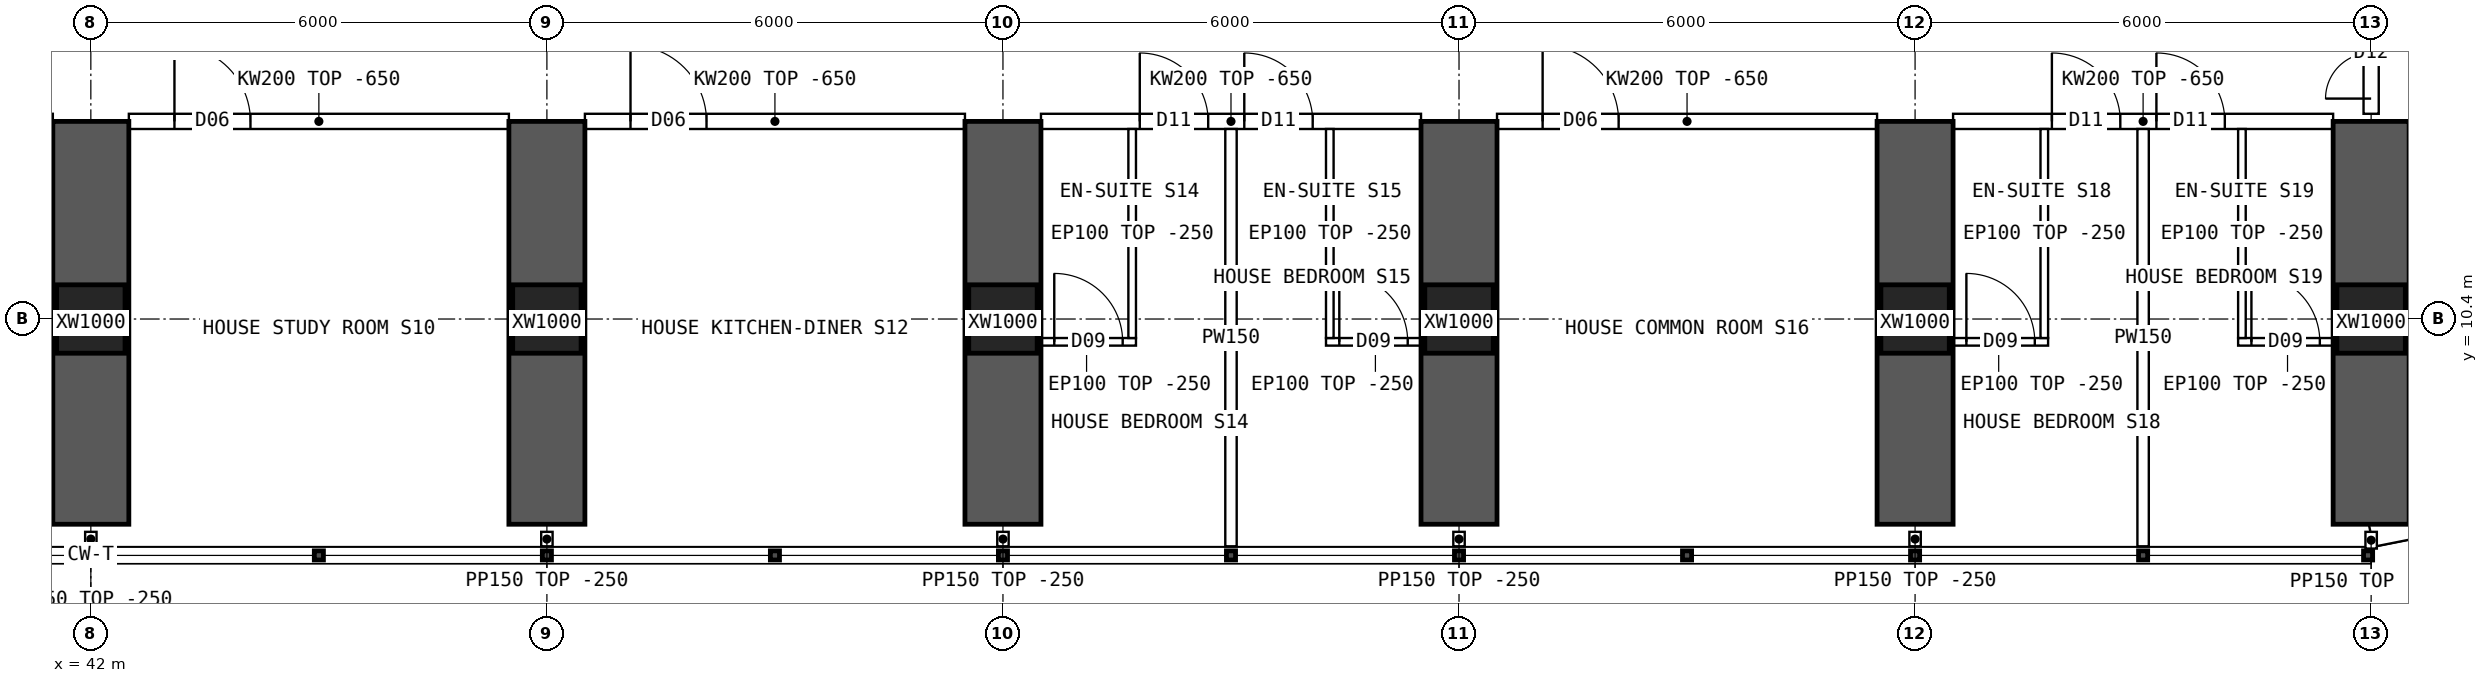
"""IFC4 building model, lengths in metres.
Left out: names, types, materials, properties, quantities, classifications, styles, units other than length and angle.
Written with IfcOpenShell. Run it as: python <this file> out.ifc"""

import sys

from ifc_helpers import new_model, si_unit, direction, frame, frame_2d, origin, origin_2d, place, context, subcontext, project, spatial, polyline, rectangle, hollow_rectangle, outline, extrude, element, fill, save


model = new_model("IFC4")
c1 = context("Model", 3, precision=1e-05, world=origin(), true_north=direction((0.0, 1.0)))
c2 = subcontext(c1, "Body", "Model", "MODEL_VIEW")
j1 = project(units=[si_unit("LENGTHUNIT", "METRE"), si_unit("PLANEANGLEUNIT", "RADIAN")], contexts=[c1])
p1 = place(None, origin())
s1 = spatial("IfcSite", under=j1, at=p1, CompositionType="ELEMENT")
p2 = place(p1, origin())
s2 = spatial("IfcBuilding", under=s1, at=p2, CompositionType="ELEMENT")
p3 = place(p2, frame((0.0, 0.0, 42.7)))
s3 = spatial("IfcBuildingStorey", under=s2, at=p3, CompositionType="ELEMENT", Elevation=42.7)
for number, where, z_axis, x_axis in (
    (1, (42.0, 10.4, 0.0), (0.0, 0.0, 1.0), (1.0, 0.0, 0.0)),
    (2, (48.0, 10.4, 0.0), (0.0, 0.0, 1.0), (1.0, 0.0, 0.0)),
    (3, (54.0, 10.4, 0.0), (0.0, 0.0, 1.0), (1.0, 0.0, 0.0)),
    (4, (60.0, 10.4, 0.0), (0.0, 0.0, 1.0), (1.0, 0.0, 0.0)),
    (5, (66.0, 10.4, 0.0), (0.0, 0.0, 1.0), (1.0, 0.0, 0.0)),
    (6, (72.0, 10.4, 0.0), (0.0, 0.0, 1.0), (1.0, 0.0, 0.0)),
):
    element("IfcColumn", number, at=place(p3, frame(where, z_axis=z_axis, x_axis=x_axis)), inside=s3, PredefinedType="COLUMN", context=c2, shape_type="SweptSolid", body=[
        extrude(hollow_rectangle(XDim=0.9, YDim=0.9, WallThickness=0.09, at=origin_2d()), origin(), (0.0, 0.0, 1.0), 3.75),
    ])
for number, where, z_axis, x_axis in (
    (7, (42.0, 7.7, 0.0), (0.0, 0.0, 1.0), (0.0, 1.0, 0.0)),
    (8, (48.0, 7.7, 0.0), (0.0, 0.0, 1.0), (0.0, 1.0, 0.0)),
    (9, (54.0, 7.7, 0.0), (0.0, 0.0, 1.0), (0.0, 1.0, 0.0)),
    (10, (60.0, 7.7, 0.0), (0.0, 0.0, 1.0), (0.0, 1.0, 0.0)),
    (11, (66.0, 7.7, 0.0), (0.0, 0.0, 1.0), (0.0, 1.0, 0.0)),
    (12, (72.0, 7.7, 0.0), (0.0, 0.0, 1.0), (0.0, 1.0, 0.0)),
):
    element("IfcWall", number, at=place(p3, frame(where, z_axis=z_axis, x_axis=x_axis)), inside=s3, PredefinedType="SHEAR", context=c2, shape_type="SweptSolid", body=[
        extrude(rectangle(XDim=5.3, YDim=1.0, at=frame_2d((2.65, 0.0))), origin(), (0.0, 0.0, 1.0), 3.75),
    ])
p4 = place(p3, frame((72.0, 7.55, 0.0), z_axis=(0.0, 0.0, 1.0), x_axis=(0.980787251524, 0.195080412259, 0.0)))
e13 = element("IfcWall", 13, at=p4, inside=s3, PredefinedType="SOLIDWALL", context=c2, shape_type="SweptSolid", body=[
    extrude(outline(polyline([(-0.03, -0.15), (3.249, -0.15), (3.189, 0.15), (0.03, 0.15), (-0.03, -0.15)])), origin(), (0.0, 0.0, 1.0), 3.5),
])
p5 = place(p4, frame((0.909, 0.0, 0.9)))
e14 = element("IfcOpeningElement", 14, at=p5, cuts=e13, PredefinedType="OPENING", context=c2, shape_type="SweptSolid", body=[
    extrude(rectangle(XDim=1.4, YDim=1.8, at=frame_2d((0.7, 0.9))), frame((0.0, 0.16, 0.0), z_axis=(0.0, -1.0, 0.0), x_axis=(1.0, 0.0, 0.0)), (0.0, 0.0, 1.0), 0.32),
])
p6 = place(p3, frame((42.5, 13.0, 0.0), z_axis=(0.0, 0.0, 1.0), x_axis=(1.0, 0.0, 0.0)))
e15 = element("IfcWall", 15, at=p6, inside=s3, PredefinedType="SOLIDWALL", context=c2, shape_type="SweptSolid", body=[
    extrude(outline(polyline([(0.0, 0.0), (5.0, 0.0), (5.0, 3.1), (0.0, 3.1), (0.0, 0.0)])), frame((0.0, 0.1, 0.0), z_axis=(0.0, -1.0, 0.0), x_axis=(1.0, 0.0, 0.0)), (0.0, 0.0, 1.0), 0.2),
])
p7 = place(p6, frame((0.6, 0.0, 0.0)))
e16 = element("IfcOpeningElement", 16, at=p7, cuts=e15, PredefinedType="OPENING", context=c2, shape_type="SweptSolid", body=[
    extrude(rectangle(XDim=1.0, YDim=2.1, at=frame_2d((0.5, 1.05))), frame((0.0, 0.11, 0.0), z_axis=(0.0, -1.0, 0.0), x_axis=(1.0, 0.0, 0.0)), (0.0, 0.0, 1.0), 0.22),
])
p8 = place(p3, frame((48.5, 13.0, 0.0), z_axis=(0.0, 0.0, 1.0), x_axis=(1.0, 0.0, 0.0)))
e17 = element("IfcWall", 17, at=p8, inside=s3, PredefinedType="SOLIDWALL", context=c2, shape_type="SweptSolid", body=[
    extrude(outline(polyline([(0.0, 0.0), (5.0, 0.0), (5.0, 3.1), (0.0, 3.1), (0.0, 0.0)])), frame((0.0, 0.1, 0.0), z_axis=(0.0, -1.0, 0.0), x_axis=(1.0, 0.0, 0.0)), (0.0, 0.0, 1.0), 0.2),
])
p9 = place(p8, frame((0.6, 0.0, 0.0)))
e18 = element("IfcOpeningElement", 18, at=p9, cuts=e17, PredefinedType="OPENING", context=c2, shape_type="SweptSolid", body=[
    extrude(rectangle(XDim=1.0, YDim=2.1, at=frame_2d((0.5, 1.05))), frame((0.0, 0.11, 0.0), z_axis=(0.0, -1.0, 0.0), x_axis=(1.0, 0.0, 0.0)), (0.0, 0.0, 1.0), 0.22),
])
p10 = place(p3, frame((54.5, 13.0, 0.0), z_axis=(0.0, 0.0, 1.0), x_axis=(1.0, 0.0, 0.0)))
e19 = element("IfcWall", 19, at=p10, inside=s3, PredefinedType="SOLIDWALL", context=c2, shape_type="SweptSolid", body=[
    extrude(outline(polyline([(0.0, 0.0), (5.0, 0.0), (5.0, 3.1), (0.0, 3.1), (0.0, 0.0)])), frame((0.0, 0.1, 0.0), z_axis=(0.0, -1.0, 0.0), x_axis=(1.0, 0.0, 0.0)), (0.0, 0.0, 1.0), 0.2),
])
p11 = place(p10, frame((1.3, 0.0, 0.0)))
e20 = element("IfcOpeningElement", 20, at=p11, cuts=e19, PredefinedType="OPENING", context=c2, shape_type="SweptSolid", body=[
    extrude(rectangle(XDim=0.9, YDim=2.1, at=frame_2d((0.45, 1.05))), frame((0.0, 0.11, 0.0), z_axis=(0.0, -1.0, 0.0), x_axis=(1.0, 0.0, 0.0)), (0.0, 0.0, 1.0), 0.22),
])
p12 = place(p10, frame((2.675, 0.0, 0.0)))
e21 = element("IfcOpeningElement", 21, at=p12, cuts=e19, PredefinedType="OPENING", context=c2, shape_type="SweptSolid", body=[
    extrude(rectangle(XDim=0.9, YDim=2.1, at=frame_2d((0.45, 1.05))), frame((0.0, 0.11, 0.0), z_axis=(0.0, -1.0, 0.0), x_axis=(1.0, 0.0, 0.0)), (0.0, 0.0, 1.0), 0.22),
])
p13 = place(p3, frame((60.5, 13.0, 0.0), z_axis=(0.0, 0.0, 1.0), x_axis=(1.0, 0.0, 0.0)))
e22 = element("IfcWall", 22, at=p13, inside=s3, PredefinedType="SOLIDWALL", context=c2, shape_type="SweptSolid", body=[
    extrude(outline(polyline([(0.0, 0.0), (5.0, 0.0), (5.0, 3.1), (0.0, 3.1), (0.0, 0.0)])), frame((0.0, 0.1, 0.0), z_axis=(0.0, -1.0, 0.0), x_axis=(1.0, 0.0, 0.0)), (0.0, 0.0, 1.0), 0.2),
])
p14 = place(p13, frame((0.6, 0.0, 0.0)))
e23 = element("IfcOpeningElement", 23, at=p14, cuts=e22, PredefinedType="OPENING", context=c2, shape_type="SweptSolid", body=[
    extrude(rectangle(XDim=1.0, YDim=2.1, at=frame_2d((0.5, 1.05))), frame((0.0, 0.11, 0.0), z_axis=(0.0, -1.0, 0.0), x_axis=(1.0, 0.0, 0.0)), (0.0, 0.0, 1.0), 0.22),
])
p15 = place(p3, frame((66.5, 13.0, 0.0), z_axis=(0.0, 0.0, 1.0), x_axis=(1.0, 0.0, 0.0)))
e24 = element("IfcWall", 24, at=p15, inside=s3, PredefinedType="SOLIDWALL", context=c2, shape_type="SweptSolid", body=[
    extrude(outline(polyline([(0.0, 0.0), (5.0, 0.0), (5.0, 3.1), (0.0, 3.1), (0.0, 0.0)])), frame((0.0, 0.1, 0.0), z_axis=(0.0, -1.0, 0.0), x_axis=(1.0, 0.0, 0.0)), (0.0, 0.0, 1.0), 0.2),
])
p16 = place(p15, frame((1.3, 0.0, 0.0)))
e25 = element("IfcOpeningElement", 25, at=p16, cuts=e24, PredefinedType="OPENING", context=c2, shape_type="SweptSolid", body=[
    extrude(rectangle(XDim=0.9, YDim=2.1, at=frame_2d((0.45, 1.05))), frame((0.0, 0.11, 0.0), z_axis=(0.0, -1.0, 0.0), x_axis=(1.0, 0.0, 0.0)), (0.0, 0.0, 1.0), 0.22),
])
p17 = place(p15, frame((2.675, 0.0, 0.0)))
e26 = element("IfcOpeningElement", 26, at=p17, cuts=e24, PredefinedType="OPENING", context=c2, shape_type="SweptSolid", body=[
    extrude(rectangle(XDim=0.9, YDim=2.1, at=frame_2d((0.45, 1.05))), frame((0.0, 0.11, 0.0), z_axis=(0.0, -1.0, 0.0), x_axis=(1.0, 0.0, 0.0)), (0.0, 0.0, 1.0), 0.22),
])
p18 = place(p3, frame((38.85, 10.3, 0.0), z_axis=(0.0, 0.0, 1.0), x_axis=(1.0, 0.0, 0.0)))
e27 = element("IfcWall", 27, at=p18, inside=s3, PredefinedType="PARTITIONING", context=c2, shape_type="SweptSolid", body=[
    extrude(outline(polyline([(0.0, 0.0), (2.7, 0.0), (2.7, 3.1), (0.0, 3.1), (0.0, 0.0)])), frame((0.0, 0.05, 0.0), z_axis=(0.0, -1.0, 0.0), x_axis=(1.0, 0.0, 0.0)), (0.0, 0.0, 1.0), 0.1),
])
p19 = place(p3, frame((57.0, 7.41, 0.0), z_axis=(0.0, 0.0, 1.0), x_axis=(0.0, 1.0, 0.0)))
e28 = element("IfcWall", 28, at=p19, inside=s3, PredefinedType="PARTITIONING", context=c2, shape_type="SweptSolid", body=[
    extrude(outline(polyline([(0.0, 0.0), (5.49, 0.0), (5.49, 3.1), (5.442, 3.1), (5.44, 3.5), (3.192, 3.5), (3.19, 3.1), (2.792, 3.1), (2.79, 3.5), (0.0, 3.5), (0.0, 0.0)])), frame((0.0, 0.075, 0.0), z_axis=(0.0, -1.0, 0.0), x_axis=(1.0, 0.0, 0.0)), (0.0, 0.0, 1.0), 0.15),
])
p20 = place(p3, frame((55.75, 10.1, 0.0), z_axis=(0.0, 0.0, 1.0), x_axis=(-1.0, 0.0, 0.0)))
e29 = element("IfcWall", 29, at=p20, inside=s3, PredefinedType="PARTITIONING", context=c2, shape_type="SweptSolid", body=[
    extrude(rectangle(XDim=1.3, YDim=0.1, at=frame_2d((0.65, 0.0))), origin(), (0.0, 0.0, 1.0), 3.5),
])
p21 = place(p20, frame((0.175, 0.0, 0.0)))
e30 = element("IfcOpeningElement", 30, at=p21, cuts=e29, PredefinedType="OPENING", context=c2, shape_type="SweptSolid", body=[
    extrude(rectangle(XDim=0.9, YDim=2.1, at=frame_2d((0.45, 1.05))), frame((0.0, 0.06, 0.0), z_axis=(0.0, -1.0, 0.0), x_axis=(1.0, 0.0, 0.0)), (0.0, 0.0, 1.0), 0.12),
])
p22 = place(p3, frame((55.7, 10.15, 0.0), z_axis=(0.0, 0.0, 1.0), x_axis=(0.0, 1.0, 0.0)))
e31 = element("IfcWall", 31, at=p22, inside=s3, PredefinedType="PARTITIONING", context=c2, shape_type="SweptSolid", body=[
    extrude(outline(polyline([(0.0, 0.0), (2.75, 0.0), (2.75, 3.1), (2.702, 3.1), (2.7, 3.5), (0.452, 3.5), (0.45, 3.1), (0.052, 3.1), (0.05, 3.5), (0.0, 3.5), (0.0, 0.0)])), frame((0.0, 0.05, 0.0), z_axis=(0.0, -1.0, 0.0), x_axis=(1.0, 0.0, 0.0)), (0.0, 0.0, 1.0), 0.1),
])
p23 = place(p3, frame((59.55, 10.1, 0.0), z_axis=(0.0, 0.0, 1.0), x_axis=(-1.0, 0.0, 0.0)))
e32 = element("IfcWall", 32, at=p23, inside=s3, PredefinedType="PARTITIONING", context=c2, shape_type="SweptSolid", body=[
    extrude(rectangle(XDim=1.3, YDim=0.1, at=frame_2d((0.65, 0.0))), origin(), (0.0, 0.0, 1.0), 3.5),
])
p24 = place(p23, frame((0.225, 0.0, 0.0)))
e33 = element("IfcOpeningElement", 33, at=p24, cuts=e32, PredefinedType="OPENING", context=c2, shape_type="SweptSolid", body=[
    extrude(rectangle(XDim=0.9, YDim=2.1, at=frame_2d((0.45, 1.05))), frame((0.0, 0.06, 0.0), z_axis=(0.0, -1.0, 0.0), x_axis=(1.0, 0.0, 0.0)), (0.0, 0.0, 1.0), 0.12),
])
p25 = place(p3, frame((58.3, 10.15, 0.0), z_axis=(0.0, 0.0, 1.0), x_axis=(0.0, 1.0, 0.0)))
e34 = element("IfcWall", 34, at=p25, inside=s3, PredefinedType="PARTITIONING", context=c2, shape_type="SweptSolid", body=[
    extrude(outline(polyline([(0.0, 0.0), (2.75, 0.0), (2.75, 3.1), (2.702, 3.1), (2.7, 3.5), (0.452, 3.5), (0.45, 3.1), (0.052, 3.1), (0.05, 3.5), (0.0, 3.5), (0.0, 0.0)])), frame((0.0, 0.05, 0.0), z_axis=(0.0, -1.0, 0.0), x_axis=(1.0, 0.0, 0.0)), (0.0, 0.0, 1.0), 0.1),
])
p26 = place(p3, frame((69.0, 7.41, 0.0), z_axis=(0.0, 0.0, 1.0), x_axis=(0.0, 1.0, 0.0)))
e35 = element("IfcWall", 35, at=p26, inside=s3, PredefinedType="PARTITIONING", context=c2, shape_type="SweptSolid", body=[
    extrude(outline(polyline([(0.0, 0.0), (5.49, 0.0), (5.49, 3.1), (5.442, 3.1), (5.44, 3.5), (3.192, 3.5), (3.19, 3.1), (2.792, 3.1), (2.79, 3.5), (0.0, 3.5), (0.0, 0.0)])), frame((0.0, 0.075, 0.0), z_axis=(0.0, -1.0, 0.0), x_axis=(1.0, 0.0, 0.0)), (0.0, 0.0, 1.0), 0.15),
])
p27 = place(p3, frame((67.75, 10.1, 0.0), z_axis=(0.0, 0.0, 1.0), x_axis=(-1.0, 0.0, 0.0)))
e36 = element("IfcWall", 36, at=p27, inside=s3, PredefinedType="PARTITIONING", context=c2, shape_type="SweptSolid", body=[
    extrude(rectangle(XDim=1.3, YDim=0.1, at=frame_2d((0.65, 0.0))), origin(), (0.0, 0.0, 1.0), 3.5),
])
p28 = place(p27, frame((0.175, 0.0, 0.0)))
e37 = element("IfcOpeningElement", 37, at=p28, cuts=e36, PredefinedType="OPENING", context=c2, shape_type="SweptSolid", body=[
    extrude(rectangle(XDim=0.9, YDim=2.1, at=frame_2d((0.45, 1.05))), frame((0.0, 0.06, 0.0), z_axis=(0.0, -1.0, 0.0), x_axis=(1.0, 0.0, 0.0)), (0.0, 0.0, 1.0), 0.12),
])
p29 = place(p3, frame((67.7, 10.15, 0.0), z_axis=(0.0, 0.0, 1.0), x_axis=(0.0, 1.0, 0.0)))
e38 = element("IfcWall", 38, at=p29, inside=s3, PredefinedType="PARTITIONING", context=c2, shape_type="SweptSolid", body=[
    extrude(outline(polyline([(0.0, 0.0), (2.75, 0.0), (2.75, 3.1), (2.702, 3.1), (2.7, 3.5), (0.452, 3.5), (0.45, 3.1), (0.052, 3.1), (0.05, 3.5), (0.0, 3.5), (0.0, 0.0)])), frame((0.0, 0.05, 0.0), z_axis=(0.0, -1.0, 0.0), x_axis=(1.0, 0.0, 0.0)), (0.0, 0.0, 1.0), 0.1),
])
p30 = place(p3, frame((71.55, 10.1, 0.0), z_axis=(0.0, 0.0, 1.0), x_axis=(-1.0, 0.0, 0.0)))
e39 = element("IfcWall", 39, at=p30, inside=s3, PredefinedType="PARTITIONING", context=c2, shape_type="SweptSolid", body=[
    extrude(rectangle(XDim=1.3, YDim=0.1, at=frame_2d((0.65, 0.0))), origin(), (0.0, 0.0, 1.0), 3.5),
])
p31 = place(p30, frame((0.225, 0.0, 0.0)))
e40 = element("IfcOpeningElement", 40, at=p31, cuts=e39, PredefinedType="OPENING", context=c2, shape_type="SweptSolid", body=[
    extrude(rectangle(XDim=0.9, YDim=2.1, at=frame_2d((0.45, 1.05))), frame((0.0, 0.06, 0.0), z_axis=(0.0, -1.0, 0.0), x_axis=(1.0, 0.0, 0.0)), (0.0, 0.0, 1.0), 0.12),
])
p32 = place(p3, frame((70.3, 10.15, 0.0), z_axis=(0.0, 0.0, 1.0), x_axis=(0.0, 1.0, 0.0)))
e41 = element("IfcWall", 41, at=p32, inside=s3, PredefinedType="PARTITIONING", context=c2, shape_type="SweptSolid", body=[
    extrude(outline(polyline([(0.0, 0.0), (2.75, 0.0), (2.75, 3.1), (2.702, 3.1), (2.7, 3.5), (0.452, 3.5), (0.45, 3.1), (0.052, 3.1), (0.05, 3.5), (0.0, 3.5), (0.0, 0.0)])), frame((0.0, 0.05, 0.0), z_axis=(0.0, -1.0, 0.0), x_axis=(1.0, 0.0, 0.0)), (0.0, 0.0, 1.0), 0.1),
])
p33 = place(p3, frame((72.0, 13.1, 0.0), z_axis=(0.0, 0.0, 1.0), x_axis=(0.0, 1.0, 0.0)))
e42 = element("IfcWall", 42, at=p33, inside=s3, PredefinedType="SOLIDWALL", context=c2, shape_type="SweptSolid", body=[
    extrude(outline(polyline([(0.0, 0.0), (1.6, 0.0), (1.6, 3.05), (0.0, 3.05), (0.0, 0.0)])), frame((0.0, 0.1, 0.0), z_axis=(0.0, -1.0, 0.0), x_axis=(1.0, 0.0, 0.0)), (0.0, 0.0, 1.0), 0.2),
])
p34 = place(p33, frame((0.2, 0.0, 0.0)))
e43 = element("IfcOpeningElement", 43, at=p34, cuts=e42, PredefinedType="OPENING", context=c2, shape_type="SweptSolid", body=[
    extrude(rectangle(XDim=1.2, YDim=2.1, at=frame_2d((0.6, 1.05))), frame((0.0, 0.11, 0.0), z_axis=(0.0, -1.0, 0.0), x_axis=(1.0, 0.0, 0.0)), (0.0, 0.0, 1.0), 0.22),
])
for number, where, z_axis, x_axis in (
    (44, (42.0, 7.6, 0.0), (0.0, 0.0, 1.0), (0.0, -1.0, 0.0)),
    (45, (48.0, 7.6, 0.0), (0.0, 0.0, 1.0), (0.0, -1.0, 0.0)),
    (46, (54.0, 7.6, 0.0), (0.0, 0.0, 1.0), (0.0, -1.0, 0.0)),
    (47, (60.0, 7.6, 0.0), (0.0, 0.0, 1.0), (0.0, -1.0, 0.0)),
    (48, (66.0, 7.6, 0.0), (0.0, 0.0, 1.0), (0.0, -1.0, 0.0)),
):
    element("IfcWall", number, at=place(p3, frame(where, z_axis=z_axis, x_axis=x_axis)), inside=s3, PredefinedType="PARTITIONING", context=c2, shape_type="SweptSolid", body=[
        extrude(rectangle(XDim=0.19, YDim=0.15, at=frame_2d((0.095, 0.0))), origin(), (0.0, 0.0, 1.0), 3.5),
    ])
p35 = place(p3, frame((72.0, 7.6, 0.0), z_axis=(0.0, 0.0, 1.0), x_axis=(0.0, -1.0, 0.0)))
e49 = element("IfcWall", 49, at=p35, inside=s3, PredefinedType="PARTITIONING", context=c2, shape_type="SweptSolid", body=[
    extrude(rectangle(XDim=0.22, YDim=0.15, at=frame_2d((0.11, 0.0))), origin(), (0.0, 0.0, 1.0), 3.5),
])
p36 = place(p7, origin())
e50 = element("IfcDoor", 50, at=p36, inside=s3, OperationType="SINGLE_SWING_LEFT", PredefinedType="DOOR", context=c2, shape_type="SweptSolid", body=[
    extrude(rectangle(XDim=1.0, YDim=2.1, at=frame_2d((0.5, 1.05))), frame((0.0, 0.025, 0.0), z_axis=(0.0, -1.0, 0.0), x_axis=(1.0, 0.0, 0.0)), (0.0, 0.0, 1.0), 0.05),
])
fill(e16, e50)
p37 = place(p9, origin())
e51 = element("IfcDoor", 51, at=p37, inside=s3, OperationType="SINGLE_SWING_LEFT", PredefinedType="DOOR", context=c2, shape_type="SweptSolid", body=[
    extrude(rectangle(XDim=1.0, YDim=2.1, at=frame_2d((0.5, 1.05))), frame((0.0, 0.025, 0.0), z_axis=(0.0, -1.0, 0.0), x_axis=(1.0, 0.0, 0.0)), (0.0, 0.0, 1.0), 0.05),
])
fill(e18, e51)
p38 = place(p21, origin())
e52 = element("IfcDoor", 52, at=p38, inside=s3, OperationType="SINGLE_SWING_RIGHT", PredefinedType="DOOR", context=c2, shape_type="SweptSolid", body=[
    extrude(rectangle(XDim=0.9, YDim=2.1, at=frame_2d((0.45, 1.05))), frame((0.0, 0.025, 0.0), z_axis=(0.0, -1.0, 0.0), x_axis=(1.0, 0.0, 0.0)), (0.0, 0.0, 1.0), 0.05),
])
fill(e30, e52)
p39 = place(p11, origin())
e53 = element("IfcDoor", 53, at=p39, inside=s3, OperationType="SINGLE_SWING_LEFT", PredefinedType="DOOR", context=c2, shape_type="SweptSolid", body=[
    extrude(rectangle(XDim=0.9, YDim=2.1, at=frame_2d((0.45, 1.05))), frame((0.0, 0.025, 0.0), z_axis=(0.0, -1.0, 0.0), x_axis=(1.0, 0.0, 0.0)), (0.0, 0.0, 1.0), 0.05),
])
fill(e20, e53)
p40 = place(p24, origin())
e54 = element("IfcDoor", 54, at=p40, inside=s3, OperationType="SINGLE_SWING_RIGHT", PredefinedType="DOOR", context=c2, shape_type="SweptSolid", body=[
    extrude(rectangle(XDim=0.9, YDim=2.1, at=frame_2d((0.45, 1.05))), frame((0.0, 0.025, 0.0), z_axis=(0.0, -1.0, 0.0), x_axis=(1.0, 0.0, 0.0)), (0.0, 0.0, 1.0), 0.05),
])
fill(e33, e54)
p41 = place(p12, origin())
e55 = element("IfcDoor", 55, at=p41, inside=s3, OperationType="SINGLE_SWING_LEFT", PredefinedType="DOOR", context=c2, shape_type="SweptSolid", body=[
    extrude(rectangle(XDim=0.9, YDim=2.1, at=frame_2d((0.45, 1.05))), frame((0.0, 0.025, 0.0), z_axis=(0.0, -1.0, 0.0), x_axis=(1.0, 0.0, 0.0)), (0.0, 0.0, 1.0), 0.05),
])
fill(e21, e55)
p42 = place(p14, origin())
e56 = element("IfcDoor", 56, at=p42, inside=s3, OperationType="SINGLE_SWING_LEFT", PredefinedType="DOOR", context=c2, shape_type="SweptSolid", body=[
    extrude(rectangle(XDim=1.0, YDim=2.1, at=frame_2d((0.5, 1.05))), frame((0.0, 0.025, 0.0), z_axis=(0.0, -1.0, 0.0), x_axis=(1.0, 0.0, 0.0)), (0.0, 0.0, 1.0), 0.05),
])
fill(e23, e56)
p43 = place(p28, origin())
e57 = element("IfcDoor", 57, at=p43, inside=s3, OperationType="SINGLE_SWING_RIGHT", PredefinedType="DOOR", context=c2, shape_type="SweptSolid", body=[
    extrude(rectangle(XDim=0.9, YDim=2.1, at=frame_2d((0.45, 1.05))), frame((0.0, 0.025, 0.0), z_axis=(0.0, -1.0, 0.0), x_axis=(1.0, 0.0, 0.0)), (0.0, 0.0, 1.0), 0.05),
])
fill(e37, e57)
p44 = place(p16, origin())
e58 = element("IfcDoor", 58, at=p44, inside=s3, OperationType="SINGLE_SWING_LEFT", PredefinedType="DOOR", context=c2, shape_type="SweptSolid", body=[
    extrude(rectangle(XDim=0.9, YDim=2.1, at=frame_2d((0.45, 1.05))), frame((0.0, 0.025, 0.0), z_axis=(0.0, -1.0, 0.0), x_axis=(1.0, 0.0, 0.0)), (0.0, 0.0, 1.0), 0.05),
])
fill(e25, e58)
p45 = place(p31, origin())
e59 = element("IfcDoor", 59, at=p45, inside=s3, OperationType="SINGLE_SWING_RIGHT", PredefinedType="DOOR", context=c2, shape_type="SweptSolid", body=[
    extrude(rectangle(XDim=0.9, YDim=2.1, at=frame_2d((0.45, 1.05))), frame((0.0, 0.025, 0.0), z_axis=(0.0, -1.0, 0.0), x_axis=(1.0, 0.0, 0.0)), (0.0, 0.0, 1.0), 0.05),
])
fill(e40, e59)
p46 = place(p17, origin())
e60 = element("IfcDoor", 60, at=p46, inside=s3, OperationType="SINGLE_SWING_LEFT", PredefinedType="DOOR", context=c2, shape_type="SweptSolid", body=[
    extrude(rectangle(XDim=0.9, YDim=2.1, at=frame_2d((0.45, 1.05))), frame((0.0, 0.025, 0.0), z_axis=(0.0, -1.0, 0.0), x_axis=(1.0, 0.0, 0.0)), (0.0, 0.0, 1.0), 0.05),
])
fill(e26, e60)
p47 = place(p34, origin())
e61 = element("IfcDoor", 61, at=p47, inside=s3, OperationType="DOUBLE_DOOR_SINGLE_SWING", PredefinedType="DOOR", context=c2, shape_type="SweptSolid", body=[
    extrude(rectangle(XDim=1.2, YDim=2.1, at=frame_2d((0.6, 1.05))), frame((0.0, 0.025, 0.0), z_axis=(0.0, -1.0, 0.0), x_axis=(1.0, 0.0, 0.0)), (0.0, 0.0, 1.0), 0.05),
])
fill(e43, e61)
save(model, sys.argv[1])
